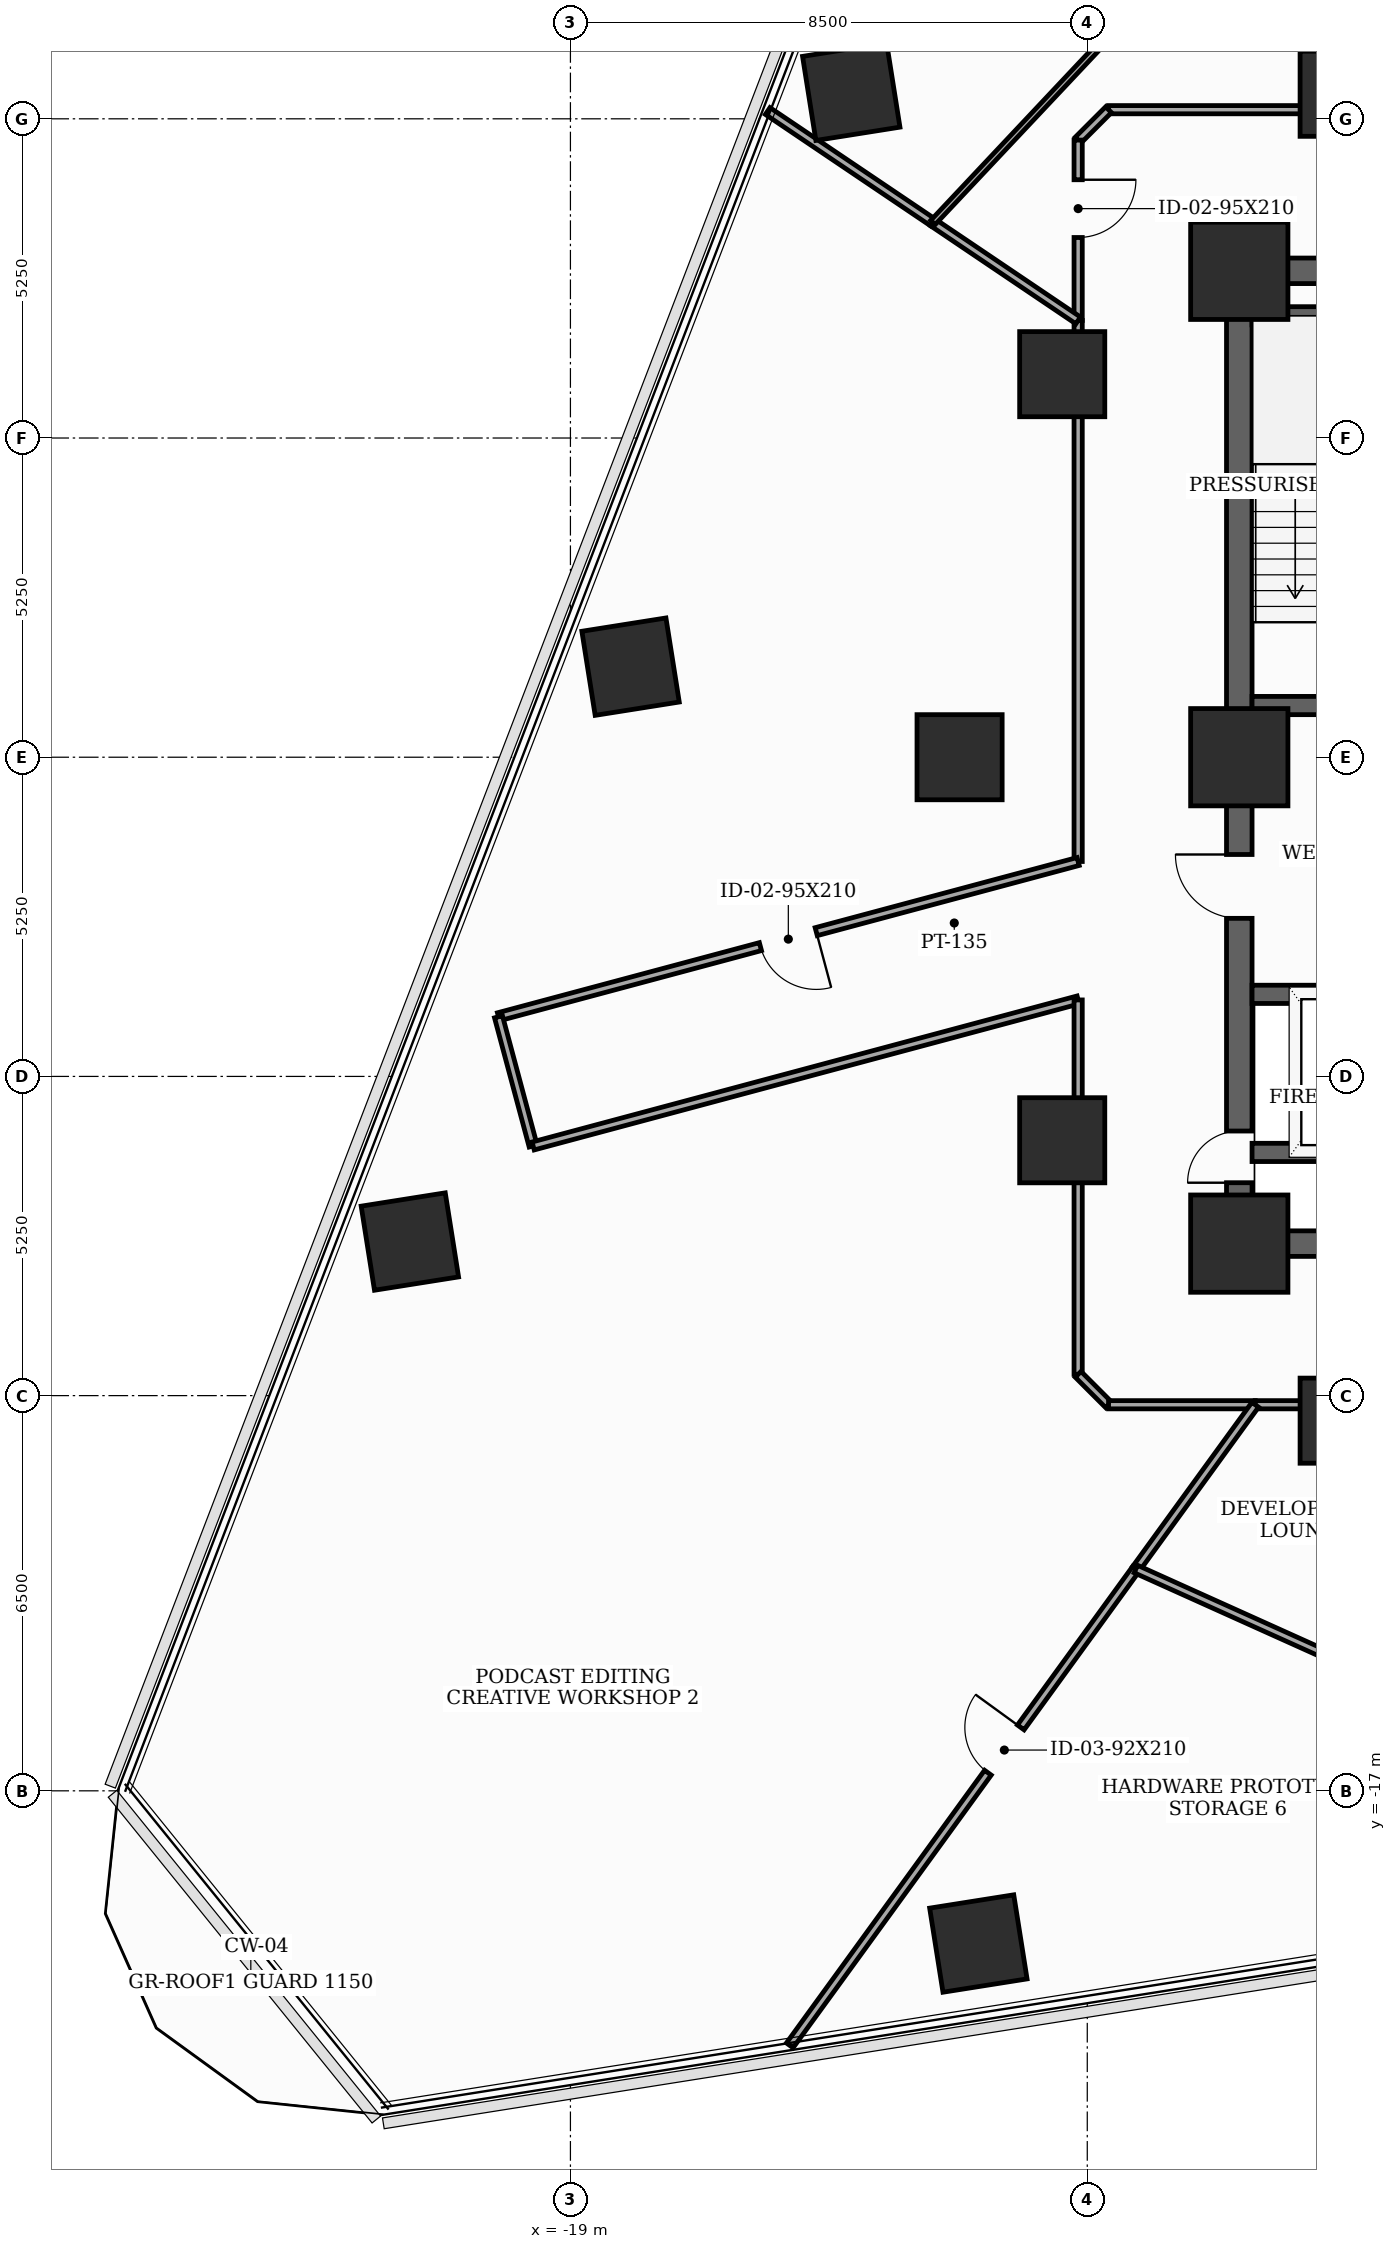
"""IFC4 building model, lengths in metres.
Left out: names, types, materials, properties, quantities, classifications, styles, units other than length and angle.
Written with IfcOpenShell. Run it as: python <this file> out.ifc"""

import sys

from ifc_helpers import new_model, si_unit, direction, frame, frame_2d, origin, origin_2d, place, context, subcontext, project, spatial, rectangle, extrude, element, fill, save


model = new_model("IFC4")
c1 = context("Model", 3, precision=1e-05, world=origin(), true_north=direction((0.0, 1.0)))
c2 = subcontext(c1, "Body", "Model", "MODEL_VIEW")
j1 = project(units=[si_unit("LENGTHUNIT", "METRE"), si_unit("PLANEANGLEUNIT", "RADIAN")], contexts=[c1])
p1 = place(None, origin())
s1 = spatial("IfcSite", under=j1, at=p1, CompositionType="ELEMENT")
p2 = place(p1, origin())
s2 = spatial("IfcBuilding", under=s1, at=p2, CompositionType="ELEMENT")
p3 = place(p2, frame((0.0, 0.0, 59.3)))
s3 = spatial("IfcBuildingStorey", under=s2, at=p3, CompositionType="ELEMENT", Elevation=59.3)
for number, where, z_axis, x_axis in (
    (1, (-8.0, -8.0, 0.0), (0.0, 0.0, 1.0), (1.0, 0.0, 0.0)),
    (2, (-8.0, 8.0, 0.0), (0.0, 0.0, 1.0), (1.0, 0.0, 0.0)),
    (3, (-8.0, 0.0, 0.0), (0.0, 0.0, 1.0), (1.0, 0.0, 0.0)),
):
    element("IfcColumn", number, at=place(p3, frame(where, z_axis=z_axis, x_axis=x_axis)), inside=s3, PredefinedType="COLUMN", context=c2, shape_type="SweptSolid", body=[
        extrude(rectangle(XDim=1.6, YDim=1.6, at=origin_2d()), origin(), (0.0, 0.0, 1.0), 3.7),
    ])
for number, where, z_axis, x_axis in (
    (4, (-6.3, 10.912, 0.0), (0.0, 0.0, 1.0), (1.0, 0.0, 0.0)),
    (5, (-10.912, 6.3, 0.0), (0.0, 0.0, 1.0), (1.0, 0.0, 0.0)),
    (6, (-12.6, 0.0, 0.0), (0.0, 0.0, 1.0), (1.0, 0.0, 0.0)),
    (7, (-10.912, -6.3, 0.0), (0.0, 0.0, 1.0), (1.0, 0.0, 0.0)),
    (8, (-6.3, -10.912, 0.0), (0.0, 0.0, 1.0), (1.0, 0.0, 0.0)),
    (9, (-12.291, -19.511, 0.0), (0.0, 0.0, 1.0), (0.988, 0.156, 0.0)),
    (10, (-14.381, 10.945, 0.0), (0.0, 0.0, 1.0), (0.988, 0.156, 0.0)),
    (11, (-18.011, 1.49, 0.0), (0.0, 0.0, 1.0), (0.988, 0.156, 0.0)),
    (12, (-21.641, -7.966, 0.0), (0.0, 0.0, 1.0), (0.988, 0.156, 0.0)),
):
    element("IfcColumn", number, at=place(p3, frame(where, z_axis=z_axis, x_axis=x_axis)), inside=s3, PredefinedType="COLUMN", context=c2, shape_type="SweptSolid", body=[
        extrude(rectangle(XDim=1.4, YDim=1.4, at=origin_2d()), origin(), (0.0, 0.0, 1.0), 3.7),
    ])
p4 = place(p3, frame((-8.0, -8.0, 0.0), z_axis=(0.0, 0.0, 1.0), x_axis=(0.0, 1.0, 0.0)))
e13 = element("IfcWall", 13, at=p4, inside=s3, PredefinedType="SHEAR", context=c2, shape_type="SweptSolid", body=[
    extrude(rectangle(XDim=16.0, YDim=0.42, at=frame_2d((8.0, 0.0))), origin(), (0.0, 0.0, 1.0), 3.5),
])
p5 = place(p4, frame((1.002, 0.0, 0.0)))
e14 = element("IfcOpeningElement", 14, at=p5, cuts=e13, PredefinedType="OPENING", context=c2, shape_type="SweptSolid", body=[
    extrude(rectangle(XDim=0.85, YDim=2.02, at=frame_2d((0.425, 1.01))), frame((0.0, 0.22, 0.0), z_axis=(0.0, -1.0, 0.0), x_axis=(1.0, 0.0, 0.0)), (0.0, 0.0, 1.0), 0.44),
])
p6 = place(p4, frame((5.35, 0.0, 0.0)))
e15 = element("IfcOpeningElement", 15, at=p6, cuts=e13, PredefinedType="OPENING", context=c2, shape_type="SweptSolid", body=[
    extrude(rectangle(XDim=1.05, YDim=2.15, at=frame_2d((0.525, 1.075))), frame((0.0, 0.22, 0.0), z_axis=(0.0, -1.0, 0.0), x_axis=(1.0, 0.0, 0.0)), (0.0, 0.0, 1.0), 0.44),
])
p7 = place(p3, frame((-8.0, -8.0, 0.0), z_axis=(0.0, 0.0, 1.0), x_axis=(1.0, 0.0, 0.0)))
e16 = element("IfcWall", 16, at=p7, inside=s3, PredefinedType="SHEAR", context=c2, shape_type="SweptSolid", body=[
    extrude(rectangle(XDim=16.0, YDim=0.42, at=frame_2d((8.0, 0.0))), origin(), (0.0, 0.0, 1.0), 3.5),
])
p8 = place(p7, frame((7.52, 0.0, 0.0)))
e17 = element("IfcOpeningElement", 17, at=p8, cuts=e16, PredefinedType="OPENING", context=c2, shape_type="SweptSolid", body=[
    extrude(rectangle(XDim=0.95, YDim=2.1, at=frame_2d((0.475, 1.05))), frame((0.0, 0.22, 0.0), z_axis=(0.0, -1.0, 0.0), x_axis=(1.0, 0.0, 0.0)), (0.0, 0.0, 1.0), 0.44),
])
p9 = place(p3, frame((-8.0, 8.0, 0.0), z_axis=(0.0, 0.0, 1.0), x_axis=(1.0, 0.0, 0.0)))
e18 = element("IfcWall", 18, at=p9, inside=s3, PredefinedType="SHEAR", context=c2, shape_type="SweptSolid", body=[
    extrude(rectangle(XDim=16.0, YDim=0.42, at=frame_2d((8.0, 0.0))), origin(), (0.0, 0.0, 1.0), 3.5),
])
p10 = place(p9, frame((7.1, 0.0, 0.0)))
e19 = element("IfcOpeningElement", 19, at=p10, cuts=e18, PredefinedType="OPENING", context=c2, shape_type="SweptSolid", body=[
    extrude(rectangle(XDim=1.8, YDim=2.15, at=frame_2d((0.9, 1.075))), frame((0.0, 0.22, 0.0), z_axis=(0.0, -1.0, 0.0), x_axis=(1.0, 0.0, 0.0)), (0.0, 0.0, 1.0), 0.44),
])
p11 = place(p3, frame((-7.79, 0.85, 0.0), z_axis=(0.0, 0.0, 1.0), x_axis=(1.0, 0.0, 0.0)))
e20 = element("IfcWall", 20, at=p11, inside=s3, PredefinedType="SHEAR", context=c2, shape_type="SweptSolid", body=[
    extrude(rectangle(XDim=3.34, YDim=0.3, at=frame_2d((1.67, 0.0))), origin(), (0.0, 0.0, 1.0), 3.5),
])
p12 = place(p11, frame((1.85, 0.0, 0.0)))
e21 = element("IfcOpeningElement", 21, at=p12, cuts=e20, PredefinedType="OPENING", context=c2, shape_type="SweptSolid", body=[
    extrude(rectangle(XDim=1.05, YDim=2.15, at=frame_2d((0.525, 1.075))), frame((0.0, 0.16, 0.0), z_axis=(0.0, -1.0, 0.0), x_axis=(1.0, 0.0, 0.0)), (0.0, 0.0, 1.0), 0.32),
])
p13 = place(p3, frame((-7.79, 7.26, 0.0), z_axis=(0.0, 0.0, 1.0), x_axis=(1.0, 0.0, 0.0)))
e22 = element("IfcWall", 22, at=p13, inside=s3, PredefinedType="SHEAR", context=c2, shape_type="SweptSolid", body=[
    extrude(rectangle(XDim=3.34, YDim=0.3, at=frame_2d((1.67, 0.0))), origin(), (0.0, 0.0, 1.0), 3.5),
])
p14 = place(p3, frame((-7.79, -3.9, 0.0), z_axis=(0.0, 0.0, 1.0), x_axis=(1.0, 0.0, 0.0)))
e23 = element("IfcWall", 23, at=p14, inside=s3, PredefinedType="SHEAR", context=c2, shape_type="SweptSolid", body=[
    extrude(rectangle(XDim=3.34, YDim=0.3, at=frame_2d((1.67, 0.0))), origin(), (0.0, 0.0, 1.0), 3.5),
])
p15 = place(p14, frame((1.27, 0.0, 0.0)))
e24 = element("IfcOpeningElement", 24, at=p15, cuts=e23, PredefinedType="OPENING", context=c2, shape_type="SweptSolid", body=[
    extrude(rectangle(XDim=1.1, YDim=2.1, at=frame_2d((0.55, 1.05))), frame((0.0, 0.16, 0.0), z_axis=(0.0, -1.0, 0.0), x_axis=(1.0, 0.0, 0.0)), (0.0, 0.0, 1.0), 0.32),
])
p16 = place(p3, frame((-7.79, -6.5, 0.0), z_axis=(0.0, 0.0, 1.0), x_axis=(1.0, 0.0, 0.0)))
e25 = element("IfcWall", 25, at=p16, inside=s3, PredefinedType="SHEAR", context=c2, shape_type="SweptSolid", body=[
    extrude(rectangle(XDim=3.34, YDim=0.3, at=frame_2d((1.67, 0.0))), origin(), (0.0, 0.0, 1.0), 3.5),
])
p17 = place(p3, frame((-10.65, 7.184, 0.0), z_axis=(0.0, 0.0, 1.0), x_axis=(0.0, -1.0, 0.0)))
e26 = element("IfcWall", 26, at=p17, inside=s3, PredefinedType="PARTITIONING", context=c2, shape_type="SweptSolid", body=[
    extrude(rectangle(XDim=8.899, YDim=0.135, at=frame_2d((4.45, 0.0))), origin(), (0.0, 0.0, 1.0), 2.785),
])
p18 = place(p3, frame((-10.65, -1.715, 0.0), z_axis=(0.0, 0.0, 1.0), x_axis=(-0.965937452198, -0.258775652721, 0.0)))
e27 = element("IfcWall", 27, at=p18, inside=s3, PredefinedType="PARTITIONING", context=c2, shape_type="SweptSolid", body=[
    extrude(rectangle(XDim=9.869, YDim=0.135, at=frame_2d((4.935, 0.0))), origin(), (0.0, 0.0, 1.0), 2.785),
])
p19 = place(p18, frame((4.46, 0.0, 0.0)))
e28 = element("IfcOpeningElement", 28, at=p19, cuts=e27, PredefinedType="OPENING", context=c2, shape_type="SweptSolid", body=[
    extrude(rectangle(XDim=0.95, YDim=2.1, at=frame_2d((0.475, 1.05))), frame((0.0, 0.077, 0.0), z_axis=(0.0, -1.0, 0.0), x_axis=(1.0, 0.0, 0.0)), (0.0, 0.0, 1.0), 0.155),
])
p20 = place(p3, frame((-20.183, -4.269, 0.0), z_axis=(0.0, 0.0, 1.0), x_axis=(0.259105843213, -0.965848933329, 0.0)))
e29 = element("IfcWall", 29, at=p20, inside=s3, PredefinedType="PARTITIONING", context=c2, shape_type="SweptSolid", body=[
    extrude(rectangle(XDim=2.2, YDim=0.135, at=frame_2d((1.1, 0.0))), origin(), (0.0, 0.0, 1.0), 2.935),
])
p21 = place(p3, frame((-19.613, -6.394, 0.0), z_axis=(0.0, 0.0, 1.0), x_axis=(0.96591410887, 0.258862771148, 0.0)))
e30 = element("IfcWall", 30, at=p21, inside=s3, PredefinedType="PARTITIONING", context=c2, shape_type="SweptSolid", body=[
    extrude(rectangle(XDim=9.28, YDim=0.135, at=frame_2d((4.64, 0.0))), origin(), (0.0, 0.0, 1.0), 2.785),
])
p22 = place(p3, frame((-10.65, -3.992, 0.0), z_axis=(0.0, 0.0, 1.0), x_axis=(0.0, -1.0, 0.0)))
e31 = element("IfcWall", 31, at=p22, inside=s3, PredefinedType="PARTITIONING", context=c2, shape_type="SweptSolid", body=[
    extrude(rectangle(XDim=6.158, YDim=0.135, at=frame_2d((3.079, 0.0))), origin(), (0.0, 0.0, 1.0), 2.785),
])
p23 = place(p3, frame((-10.65, -10.15, 0.0), z_axis=(0.0, 0.0, 1.0), x_axis=(0.707106781187, -0.707106781187, 0.0)))
e32 = element("IfcWall", 32, at=p23, inside=s3, PredefinedType="PARTITIONING", context=c2, shape_type="SweptSolid", body=[
    extrude(rectangle(XDim=0.707, YDim=0.135, at=frame_2d((0.354, 0.0))), origin(), (0.0, 0.0, 1.0), 3.5),
])
p24 = place(p3, frame((-10.15, -10.65, 0.0), z_axis=(0.0, 0.0, 1.0), x_axis=(1.0, 0.0, 0.0)))
e33 = element("IfcWall", 33, at=p24, inside=s3, PredefinedType="PARTITIONING", context=c2, shape_type="SweptSolid", body=[
    extrude(rectangle(XDim=2.412, YDim=0.135, at=frame_2d((1.206, 0.0))), origin(), (0.0, 0.0, 1.0), 3.5),
])
p25 = place(p3, frame((-7.738, -10.65, 0.0), z_axis=(0.0, 0.0, 1.0), x_axis=(1.0, 0.0, 0.0)))
e34 = element("IfcWall", 34, at=p25, inside=s3, PredefinedType="PARTITIONING", context=c2, shape_type="SweptSolid", body=[
    extrude(rectangle(XDim=2.888, YDim=0.135, at=frame_2d((1.444, 0.0))), origin(), (0.0, 0.0, 1.0), 2.785),
])
p26 = place(p3, frame((-3.054, 10.65, 0.0), z_axis=(0.0, 0.0, 1.0), x_axis=(-1.0, 0.0, 0.0)))
e35 = element("IfcWall", 35, at=p26, inside=s3, PredefinedType="PARTITIONING", context=c2, shape_type="SweptSolid", body=[
    extrude(rectangle(XDim=7.096, YDim=0.135, at=frame_2d((3.548, 0.0))), origin(), (0.0, 0.0, 1.0), 2.785),
])
p27 = place(p3, frame((-10.15, 10.65, 0.0), z_axis=(0.0, 0.0, 1.0), x_axis=(-0.707106781187, -0.707106781187, 0.0)))
e36 = element("IfcWall", 36, at=p27, inside=s3, PredefinedType="PARTITIONING", context=c2, shape_type="SweptSolid", body=[
    extrude(rectangle(XDim=0.707, YDim=0.135, at=frame_2d((0.354, 0.0))), origin(), (0.0, 0.0, 1.0), 3.5),
])
p28 = place(p3, frame((-10.65, 10.15, 0.0), z_axis=(0.0, 0.0, 1.0), x_axis=(0.0, -1.0, 0.0)))
e37 = element("IfcWall", 37, at=p28, inside=s3, PredefinedType="PARTITIONING", context=c2, shape_type="SweptSolid", body=[
    extrude(rectangle(XDim=2.966, YDim=0.135, at=frame_2d((1.483, 0.0))), origin(), (0.0, 0.0, 1.0), 3.5),
])
p29 = place(p28, frame((0.652, 0.0, 0.0)))
e38 = element("IfcOpeningElement", 38, at=p29, cuts=e37, PredefinedType="OPENING", context=c2, shape_type="SweptSolid", body=[
    extrude(rectangle(XDim=0.95, YDim=2.1, at=frame_2d((0.475, 1.05))), frame((0.0, 0.077, 0.0), z_axis=(0.0, -1.0, 0.0), x_axis=(1.0, 0.0, 0.0)), (0.0, 0.0, 1.0), 0.155),
])
p30 = place(p3, frame((-15.393, -21.187, 0.0), z_axis=(0.0, 0.0, 1.0), x_axis=(0.587736917223, 0.809052109653, 0.0)))
e39 = element("IfcWall", 39, at=p30, inside=s3, PredefinedType="PARTITIONING", context=c2, shape_type="SweptSolid", body=[
    extrude(rectangle(XDim=9.684, YDim=0.135, at=frame_2d((4.842, 0.0))), origin(), (0.0, 0.0, 1.0), 2.935),
])
p31 = place(p30, frame((5.544, 0.0, 0.0)))
e40 = element("IfcOpeningElement", 40, at=p31, cuts=e39, PredefinedType="OPENING", context=c2, shape_type="SweptSolid", body=[
    extrude(rectangle(XDim=0.92, YDim=2.1, at=frame_2d((0.46, 1.05))), frame((0.0, 0.077, 0.0), z_axis=(0.0, -1.0, 0.0), x_axis=(1.0, 0.0, 0.0)), (0.0, 0.0, 1.0), 0.155),
])
p32 = place(p3, frame((-9.701, -13.352, 0.0), z_axis=(0.0, 0.0, 1.0), x_axis=(0.587719574609, 0.809064707932, 0.0)))
e41 = element("IfcWall", 41, at=p32, inside=s3, PredefinedType="PARTITIONING", context=c2, shape_type="SweptSolid", body=[
    extrude(rectangle(XDim=3.34, YDim=0.135, at=frame_2d((1.67, 0.0))), origin(), (0.0, 0.0, 1.0), 3.5),
])
p33 = place(p3, frame((-13.038, 8.795, 0.0), z_axis=(0.0, 0.0, 1.0), x_axis=(-0.829071326064, 0.559142858578, 0.0)))
e42 = element("IfcWall", 42, at=p33, inside=s3, PredefinedType="PARTITIONING", context=c2, shape_type="SweptSolid", body=[
    extrude(rectangle(XDim=3.279, YDim=0.135, at=frame_2d((1.639, 0.0))), origin(), (0.0, 0.0, 1.0), 2.785),
])
p34 = place(p3, frame((-10.65, 7.184, 0.0), z_axis=(0.0, 0.0, 1.0), x_axis=(-0.829039234985, 0.559190438809, 0.0)))
e43 = element("IfcWall", 43, at=p34, inside=s3, PredefinedType="PARTITIONING", context=c2, shape_type="SweptSolid", body=[
    extrude(rectangle(XDim=2.881, YDim=0.135, at=frame_2d((1.44, 0.0))), origin(), (0.0, 0.0, 1.0), 2.785),
])
p35 = place(p3, frame((-3.167, -16.295, 0.0), z_axis=(0.0, 0.0, 1.0), x_axis=(-0.911785675506, 0.410666387645, 0.0)))
e44 = element("IfcWall", 44, at=p35, inside=s3, PredefinedType="PARTITIONING", context=c2, shape_type="SweptSolid", body=[
    extrude(rectangle(XDim=7.166, YDim=0.135, at=frame_2d((3.583, 0.0))), origin(), (0.0, 0.0, 1.0), 2.785),
])
p36 = place(p3, frame((-13.038, 8.795, 0.0), z_axis=(0.0, 0.0, 1.0), x_axis=(0.685214439986, 0.728341383716, 0.0)))
e45 = element("IfcWall", 45, at=p36, inside=s3, PredefinedType="MOVABLE", context=c2, shape_type="SweptSolid", body=[
    extrude(rectangle(XDim=5.474, YDim=0.1, at=frame_2d((2.737, 0.0))), origin(), (0.0, 0.0, 1.0), 2.785),
])
p37 = place(p5, origin())
e46 = element("IfcDoor", 46, at=p37, inside=s3, OperationType="SINGLE_SWING_LEFT", PredefinedType="TRAPDOOR", context=c2, shape_type="SweptSolid", body=[
    extrude(rectangle(XDim=0.85, YDim=2.02, at=frame_2d((0.425, 1.01))), frame((0.0, 0.025, 0.0), z_axis=(0.0, -1.0, 0.0), x_axis=(1.0, 0.0, 0.0)), (0.0, 0.0, 1.0), 0.05),
])
fill(e14, e46)
p38 = place(p6, origin())
e47 = element("IfcDoor", 47, at=p38, inside=s3, OperationType="SINGLE_SWING_RIGHT", PredefinedType="DOOR", context=c2, shape_type="SweptSolid", body=[
    extrude(rectangle(XDim=1.05, YDim=2.15, at=frame_2d((0.525, 1.075))), frame((0.0, 0.025, 0.0), z_axis=(0.0, -1.0, 0.0), x_axis=(1.0, 0.0, 0.0)), (0.0, 0.0, 1.0), 0.05),
])
fill(e15, e47)
p39 = place(p19, origin())
e48 = element("IfcDoor", 48, at=p39, inside=s3, OperationType="SINGLE_SWING_LEFT", PredefinedType="DOOR", context=c2, shape_type="SweptSolid", body=[
    extrude(rectangle(XDim=0.95, YDim=2.1, at=frame_2d((0.475, 1.05))), frame((0.0, 0.025, 0.0), z_axis=(0.0, -1.0, 0.0), x_axis=(1.0, 0.0, 0.0)), (0.0, 0.0, 1.0), 0.05),
])
fill(e28, e48)
p40 = place(p29, origin())
e49 = element("IfcDoor", 49, at=p40, inside=s3, OperationType="SINGLE_SWING_LEFT", PredefinedType="DOOR", context=c2, shape_type="SweptSolid", body=[
    extrude(rectangle(XDim=0.95, YDim=2.1, at=frame_2d((0.475, 1.05))), frame((0.0, 0.025, 0.0), z_axis=(0.0, -1.0, 0.0), x_axis=(1.0, 0.0, 0.0)), (0.0, 0.0, 1.0), 0.05),
])
fill(e38, e49)
p41 = place(p31, origin())
e50 = element("IfcDoor", 50, at=p41, inside=s3, OperationType="SINGLE_SWING_RIGHT", PredefinedType="DOOR", context=c2, shape_type="SweptSolid", body=[
    extrude(rectangle(XDim=0.92, YDim=2.1, at=frame_2d((0.46, 1.05))), frame((0.0, 0.025, 0.0), z_axis=(0.0, -1.0, 0.0), x_axis=(1.0, 0.0, 0.0)), (0.0, 0.0, 1.0), 0.05),
])
fill(e40, e50)
save(model, sys.argv[1])
